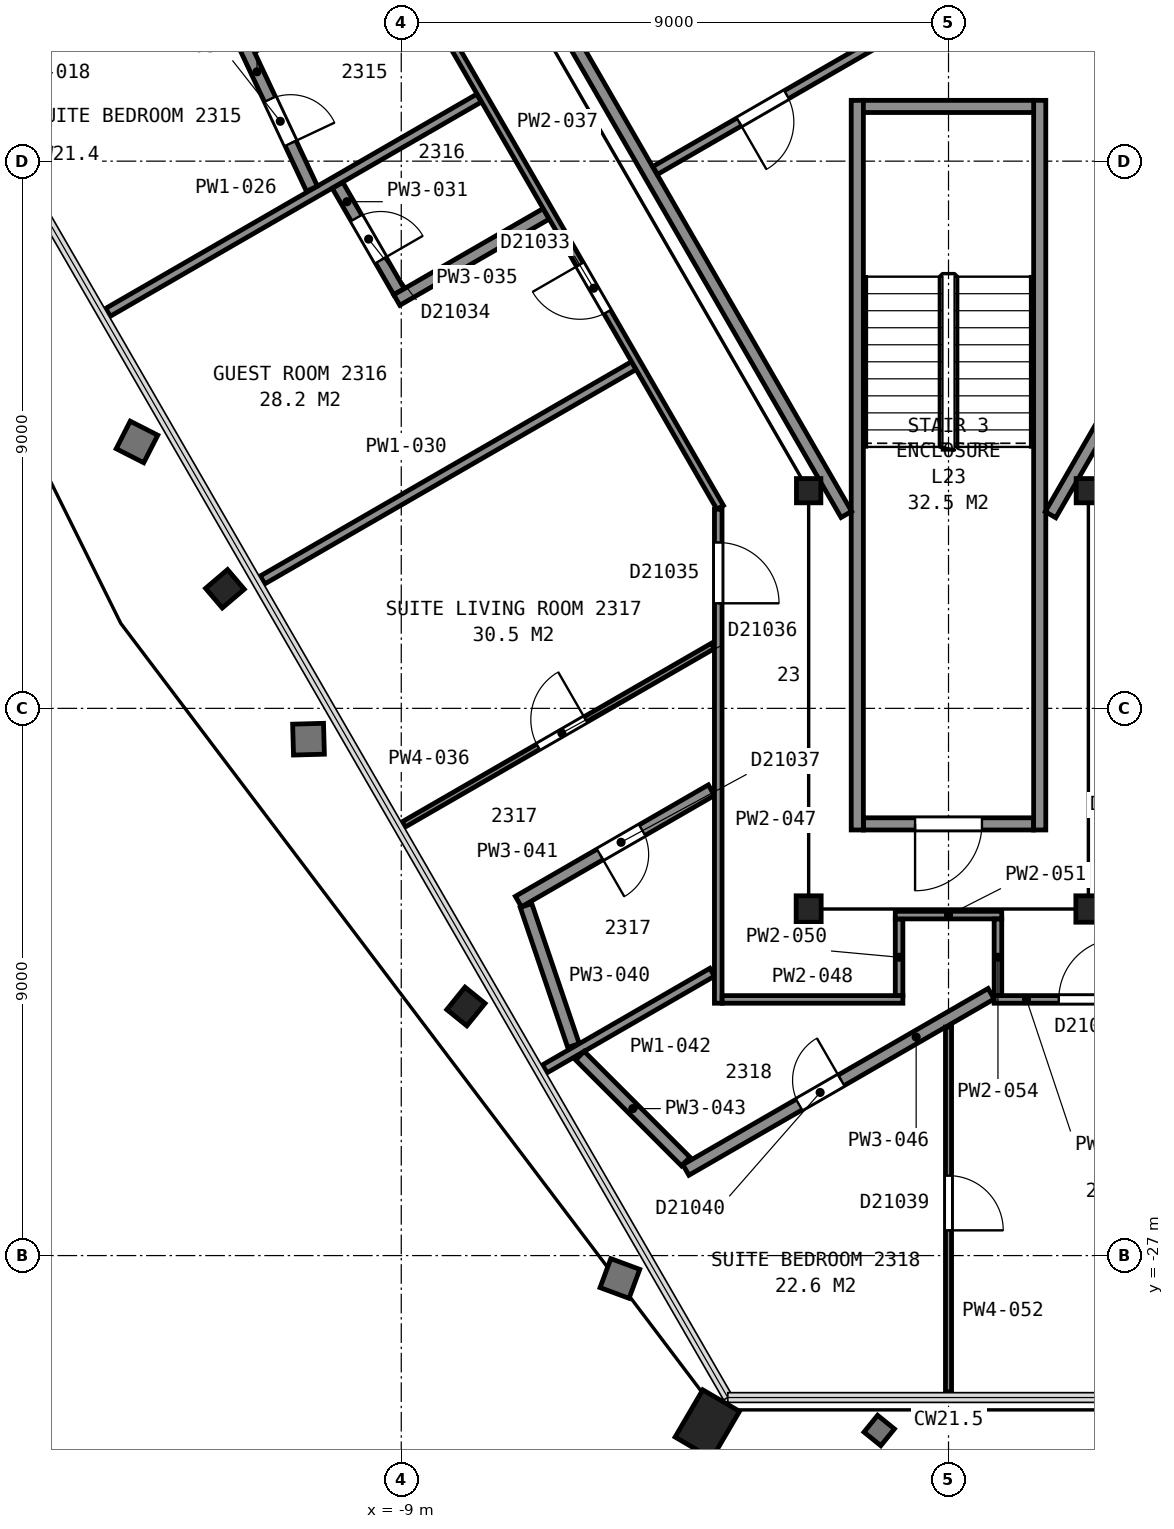
"""IFC4 building model, lengths in metres.
Left out: names, types, materials, properties, quantities, classifications, styles, units other than length and angle.
Written with IfcOpenShell. Run it as: python <this file> out.ifc"""

import sys

from ifc_helpers import new_model, si_unit, direction, frame, frame_2d, origin, origin_2d, place, context, subcontext, project, spatial, rectangle, hollow_rectangle, i_section, extrude, element, fill, save


model = new_model("IFC4")
c1 = context("Model", 3, precision=1e-05, world=origin(), true_north=direction((0.0, 1.0)))
c2 = subcontext(c1, "Body", "Model", "MODEL_VIEW")
j1 = project(units=[si_unit("LENGTHUNIT", "METRE"), si_unit("PLANEANGLEUNIT", "RADIAN")], contexts=[c1])
p1 = place(None, origin())
s1 = spatial("IfcSite", under=j1, at=p1, CompositionType="ELEMENT")
p2 = place(p1, origin())
s2 = spatial("IfcBuilding", under=s1, at=p2, CompositionType="ELEMENT")
p3 = place(p2, frame((0.0, 0.0, 100.0)))
s3 = spatial("IfcBuildingStorey", under=s2, at=p3, CompositionType="ELEMENT", Elevation=100.0)
p4 = place(p3, frame((-11.726, -15.885, 0.04), z_axis=(-0.147122626848, -0.12541489421, 0.981135075807), x_axis=(-0.499983433804, 0.865301512417, 0.035635074456)))
e1 = element("IfcColumn", 1, at=p4, inside=s3, PredefinedType="COLUMN", context=c2, shape_type="SweptSolid", body=[
    extrude(i_section(OverallWidth=0.424, OverallDepth=0.475, WebThickness=0.048, FlangeThickness=0.077, FilletRadius=0.015, at=origin_2d()), origin(), (0.0, 0.0, 1.0), 3.588),
])
p5 = place(p3, frame((-7.786, -22.717, 0.045), z_axis=(-0.127836504711, -0.157735399526, 0.979171778494), x_axis=(-0.498572298462, 0.863680403358, 0.074039341307)))
e2 = element("IfcColumn", 2, at=p5, inside=s3, PredefinedType="COLUMN", context=c2, shape_type="SweptSolid", body=[
    extrude(i_section(OverallWidth=0.424, OverallDepth=0.475, WebThickness=0.048, FlangeThickness=0.077, FilletRadius=0.015, at=origin_2d()), origin(), (0.0, 0.0, 1.0), 3.585),
])
p6 = place(p3, frame((-3.838, -29.555, 0.075), z_axis=(-0.111147334109, -0.189640824097, 0.975542222539), x_axis=(-0.993578089835, 0.000278243023, -0.113148141749)))
e3 = element("IfcColumn", 3, at=p6, inside=s3, PredefinedType="COLUMN", context=c2, shape_type="SweptSolid", body=[
    extrude(hollow_rectangle(XDim=0.7, YDim=0.9, WallThickness=0.065, at=origin_2d()), origin(), (0.0, 0.0, 1.0), 3.536),
])
p7 = place(p3, frame((-2.3, -14.42, 0.0), z_axis=(0.0, 0.0, 1.0), x_axis=(1.0, 0.0, 0.0)))
e4 = element("IfcColumn", 4, at=p7, inside=s3, PredefinedType="COLUMN", context=c2, shape_type="SweptSolid", body=[
    extrude(i_section(OverallWidth=0.401, OverallDepth=0.399, WebThickness=0.025, FlangeThickness=0.04, FilletRadius=0.015, at=origin_2d()), origin(), (0.0, 0.0, 1.0), 3.6),
])
for number, where, z_axis, x_axis in (
    (5, (-2.3, -21.3, 0.0), (0.0, 0.0, 1.0), (-1.0, 0.0, 0.0)),
    (6, (2.3, -21.3, 0.0), (0.0, 0.0, 1.0), (-1.0, 0.0, 0.0)),
):
    element("IfcColumn", number, at=place(p3, frame(where, z_axis=z_axis, x_axis=x_axis)), inside=s3, PredefinedType="COLUMN", context=c2, shape_type="SweptSolid", body=[
        extrude(i_section(OverallWidth=0.411, OverallDepth=0.434, WebThickness=0.036, FlangeThickness=0.057, FilletRadius=0.015, at=origin_2d()), origin(), (0.0, 0.0, 1.0), 3.6),
    ])
p8 = place(p3, frame((2.3, -14.42, 0.0), z_axis=(0.0, 0.0, 1.0), x_axis=(1.0, 0.0, 0.0)))
e7 = element("IfcColumn", 7, at=p8, inside=s3, PredefinedType="COLUMN", context=c2, shape_type="SweptSolid", body=[
    extrude(i_section(OverallWidth=0.401, OverallDepth=0.399, WebThickness=0.025, FlangeThickness=0.04, FilletRadius=0.015, at=origin_2d()), origin(), (0.0, 0.0, 1.0), 3.6),
])
p9 = place(p3, frame((-1.4, -19.9, 0.0), z_axis=(0.0, 0.0, 1.0), x_axis=(1.0, 0.0, 0.0)))
e8 = element("IfcWall", 8, at=p9, inside=s3, PredefinedType="PARTITIONING", context=c2, shape_type="SweptSolid", body=[
    extrude(rectangle(XDim=2.8, YDim=0.2, at=frame_2d((1.4, 0.0))), origin(), (0.0, 0.0, 1.0), 3.35),
])
p10 = place(p9, frame((0.85, 0.0, 0.0)))
e9 = element("IfcOpeningElement", 9, at=p10, cuts=e8, PredefinedType="OPENING", context=c2, shape_type="SweptSolid", body=[
    extrude(rectangle(XDim=1.1, YDim=2.1, at=frame_2d((0.55, 1.05))), frame((0.0, 0.11, 0.0), z_axis=(0.0, -1.0, 0.0), x_axis=(1.0, 0.0, 0.0)), (0.0, 0.0, 1.0), 0.22),
])
for number, where, z_axis, x_axis in (
    (10, (1.5, -8.0, 0.0), (0.0, 0.0, 1.0), (0.0, -1.0, 0.0)),
    (11, (-1.5, -8.0, 0.0), (0.0, 0.0, 1.0), (0.0, -1.0, 0.0)),
):
    element("IfcWall", number, at=place(p3, frame(where, z_axis=z_axis, x_axis=x_axis)), inside=s3, PredefinedType="PARTITIONING", context=c2, shape_type="SweptSolid", body=[
        extrude(rectangle(XDim=12.0, YDim=0.2, at=frame_2d((6.0, 0.0))), origin(), (0.0, 0.0, 1.0), 3.35),
    ])
p11 = place(p3, frame((-1.4, -8.1, 0.0), z_axis=(0.0, 0.0, 1.0), x_axis=(1.0, 0.0, 0.0)))
e12 = element("IfcWall", 12, at=p11, inside=s3, PredefinedType="PARTITIONING", context=c2, shape_type="SweptSolid", body=[
    extrude(rectangle(XDim=2.8, YDim=0.2, at=frame_2d((1.4, 0.0))), origin(), (0.0, 0.0, 1.0), 3.35),
])
p12 = place(p3, frame((-13.664, 5.946, 0.0), z_axis=(0.0, 0.0, 1.0), x_axis=(0.499994327219, -0.866028678941, 0.0)))
e13 = element("IfcWall", 13, at=p12, inside=s3, PredefinedType="PARTITIONING", context=c2, shape_type="SweptSolid", body=[
    extrude(rectangle(XDim=23.968, YDim=0.2, at=frame_2d((11.984, 0.0))), origin(), (0.0, 0.0, 1.0), 3.35),
])
p13 = place(p3, frame((-4.825, -9.154, 0.0), z_axis=(0.0, 0.0, 1.0), x_axis=(0.866023738697, 0.500002884005, 0.0)))
e14 = element("IfcWall", 14, at=p13, inside=s3, PredefinedType="PARTITIONING", context=c2, shape_type="SweptSolid", body=[
    extrude(rectangle(XDim=4.22, YDim=0.15, at=frame_2d((2.11, 0.0))), origin(), (0.0, 0.0, 1.0), 3.35),
])
p14 = place(p13, frame((1.595, 0.0, 0.0)))
e15 = element("IfcOpeningElement", 15, at=p14, cuts=e14, PredefinedType="OPENING", context=c2, shape_type="SweptSolid", body=[
    extrude(rectangle(XDim=0.9, YDim=2.1, at=frame_2d((0.45, 1.05))), frame((0.0, 0.085, 0.0), z_axis=(0.0, -1.0, 0.0), x_axis=(1.0, 0.0, 0.0)), (0.0, 0.0, 1.0), 0.17),
])
p15 = place(p3, frame((1.677, -14.815, 0.0), z_axis=(0.0, 0.0, 1.0), x_axis=(0.49999445743, 0.866028603765, 0.0)))
e16 = element("IfcWall", 16, at=p15, inside=s3, PredefinedType="PARTITIONING", context=c2, shape_type="SweptSolid", body=[
    extrude(rectangle(XDim=5.905, YDim=0.2, at=frame_2d((2.952, 0.0))), origin(), (0.0, 0.0, 1.0), 3.35),
])
p16 = place(p15, frame((3.855, 0.0, 0.0)))
e17 = element("IfcOpeningElement", 17, at=p16, cuts=e16, PredefinedType="OPENING", context=c2, shape_type="SweptSolid", body=[
    extrude(rectangle(XDim=1.8, YDim=2.1, at=frame_2d((0.9, 1.05))), frame((0.0, 0.11, 0.0), z_axis=(0.0, -1.0, 0.0), x_axis=(1.0, 0.0, 0.0)), (0.0, 0.0, 1.0), 0.22),
])
p17 = place(p3, frame((-10.037, -3.94, 0.0), z_axis=(0.0, 0.0, 1.0), x_axis=(-0.866063951978, -0.499933226626, 0.0)))
e18 = element("IfcWall", 18, at=p17, inside=s3, PredefinedType="PARTITIONING", context=c2, shape_type="SweptSolid", body=[
    extrude(rectangle(XDim=7.052, YDim=0.1, at=frame_2d((3.526, 0.0))), origin(), (0.0, 0.0, 1.0), 2.613),
])
p18 = place(p17, frame((2.998, 0.0, 0.0)))
e19 = element("IfcOpeningElement", 19, at=p18, cuts=e18, PredefinedType="OPENING", context=c2, shape_type="SweptSolid", body=[
    extrude(rectangle(XDim=0.9, YDim=2.1, at=frame_2d((0.45, 1.05))), frame((0.0, 0.06, 0.0), z_axis=(0.0, -1.0, 0.0), x_axis=(1.0, 0.0, 0.0)), (0.0, 0.0, 1.0), 0.12),
])
p19 = place(p3, frame((-13.823, -11.487, 0.0), z_axis=(0.0, 0.0, 1.0), x_axis=(0.865980767462, 0.500077304409, 0.0)))
e20 = element("IfcWall", 20, at=p19, inside=s3, PredefinedType="PARTITIONING", context=c2, shape_type="SweptSolid", body=[
    extrude(rectangle(XDim=7.047, YDim=0.15, at=frame_2d((3.524, 0.0))), origin(), (0.0, 0.0, 1.0), 2.613),
])
p20 = place(p3, frame((-11.585, -7.077, 0.0), z_axis=(0.0, 0.0, 1.0), x_axis=(0.425434257814, -0.904989332688, 0.0)))
e21 = element("IfcWall", 21, at=p20, inside=s3, PredefinedType="PARTITIONING", context=c2, shape_type="SweptSolid", body=[
    extrude(rectangle(XDim=2.625, YDim=0.2, at=frame_2d((1.313, 0.0))), origin(), (0.0, 0.0, 1.0), 2.613),
])
p21 = place(p20, frame((1.0, 0.0, 0.0)))
e22 = element("IfcOpeningElement", 22, at=p21, cuts=e21, PredefinedType="OPENING", context=c2, shape_type="SweptSolid", body=[
    extrude(rectangle(XDim=0.8, YDim=2.1, at=frame_2d((0.4, 1.05))), frame((0.0, 0.11, 0.0), z_axis=(0.0, -1.0, 0.0), x_axis=(1.0, 0.0, 0.0)), (0.0, 0.0, 1.0), 0.22),
])
p22 = place(p3, frame((-11.282, -15.888, 0.0), z_axis=(0.0, 0.0, 1.0), x_axis=(0.866031654768, 0.499989172823, 0.0)))
e23 = element("IfcWall", 23, at=p22, inside=s3, PredefinedType="PARTITIONING", context=c2, shape_type="SweptSolid", body=[
    extrude(rectangle(XDim=7.052, YDim=0.15, at=frame_2d((3.526, 0.0))), origin(), (0.0, 0.0, 1.0), 2.613),
])
p23 = place(p3, frame((-10.047, -9.398, 0.0), z_axis=(0.0, 0.0, 1.0), x_axis=(0.499935208997, -0.866062807656, 0.0)))
e24 = element("IfcWall", 24, at=p23, inside=s3, PredefinedType="PARTITIONING", context=c2, shape_type="SweptSolid", body=[
    extrude(rectangle(XDim=2.02, YDim=0.2, at=frame_2d((1.01, 0.0))), origin(), (0.0, 0.0, 1.0), 2.613),
])
p24 = place(p23, frame((0.62, 0.0, 0.0)))
e25 = element("IfcOpeningElement", 25, at=p24, cuts=e24, PredefinedType="OPENING", context=c2, shape_type="SweptSolid", body=[
    extrude(rectangle(XDim=0.8, YDim=2.1, at=frame_2d((0.4, 1.05))), frame((0.0, 0.11, 0.0), z_axis=(0.0, -1.0, 0.0), x_axis=(1.0, 0.0, 0.0)), (0.0, 0.0, 1.0), 0.22),
])
p25 = place(p3, frame((-9.074, -11.284, 0.0), z_axis=(0.0, 0.0, 1.0), x_axis=(0.866197046655, 0.499702587912, 0.0)))
e26 = element("IfcWall", 26, at=p25, inside=s3, PredefinedType="PARTITIONING", context=c2, shape_type="SweptSolid", body=[
    extrude(rectangle(XDim=2.837, YDim=0.2, at=frame_2d((1.418, 0.0))), origin(), (0.0, 0.0, 1.0), 2.613),
])
p26 = place(p3, frame((-3.875, -16.972, 0.0), z_axis=(0.0, 0.0, 1.0), x_axis=(-0.86602429061, -0.500001928069, 0.0)))
e27 = element("IfcWall", 27, at=p26, inside=s3, PredefinedType="PARTITIONING", context=c2, shape_type="SweptSolid", body=[
    extrude(rectangle(XDim=5.873, YDim=0.1, at=frame_2d((2.937, 0.0))), origin(), (0.0, 0.0, 1.0), 2.613),
])
p27 = place(p26, frame((2.419, 0.0, 0.0)))
e28 = element("IfcOpeningElement", 28, at=p27, cuts=e27, PredefinedType="OPENING", context=c2, shape_type="SweptSolid", body=[
    extrude(rectangle(XDim=0.9, YDim=2.1, at=frame_2d((0.45, 1.05))), frame((0.0, 0.06, 0.0), z_axis=(0.0, -1.0, 0.0), x_axis=(1.0, 0.0, 0.0)), (0.0, 0.0, 1.0), 0.12),
])
p28 = place(p3, frame((-3.756, -14.694, 0.0), z_axis=(0.0, 0.0, 1.0), x_axis=(-0.500051472265, 0.865995684219, 0.0)))
e29 = element("IfcWall", 29, at=p28, inside=s3, PredefinedType="PARTITIONING", context=c2, shape_type="SweptSolid", body=[
    extrude(rectangle(XDim=10.02, YDim=0.125, at=frame_2d((5.01, 0.0))), origin(), (0.0, 0.0, 1.0), 2.613),
])
p29 = place(p28, frame((3.711, 0.0, 0.0)))
e30 = element("IfcOpeningElement", 30, at=p29, cuts=e29, PredefinedType="OPENING", context=c2, shape_type="SweptSolid", body=[
    extrude(rectangle(XDim=0.9, YDim=2.1, at=frame_2d((0.45, 1.05))), frame((0.0, 0.073, 0.0), z_axis=(0.0, -1.0, 0.0), x_axis=(1.0, 0.0, 0.0)), (0.0, 0.0, 1.0), 0.145),
])
p30 = place(p3, frame((-6.948, -21.242, 0.0), z_axis=(0.0, 0.0, 1.0), x_axis=(0.321098754357, -0.947045716927, 0.0)))
e31 = element("IfcWall", 31, at=p30, inside=s3, PredefinedType="PARTITIONING", context=c2, shape_type="SweptSolid", body=[
    extrude(rectangle(XDim=2.434, YDim=0.2, at=frame_2d((1.217, 0.0))), origin(), (0.0, 0.0, 1.0), 2.613),
])
p31 = place(p3, frame((-3.899, -19.345, 0.0), z_axis=(0.0, 0.0, 1.0), x_axis=(-0.865971488458, -0.500093372459, 0.0)))
e32 = element("IfcWall", 32, at=p31, inside=s3, PredefinedType="PARTITIONING", context=c2, shape_type="SweptSolid", body=[
    extrude(rectangle(XDim=3.665, YDim=0.2, at=frame_2d((1.833, 0.0))), origin(), (0.0, 0.0, 1.0), 2.613),
])
p32 = place(p31, frame((1.315, 0.0, 0.0)))
e33 = element("IfcOpeningElement", 33, at=p32, cuts=e32, PredefinedType="OPENING", context=c2, shape_type="SweptSolid", body=[
    extrude(rectangle(XDim=0.8, YDim=2.1, at=frame_2d((0.4, 1.05))), frame((0.0, 0.11, 0.0), z_axis=(0.0, -1.0, 0.0), x_axis=(1.0, 0.0, 0.0)), (0.0, 0.0, 1.0), 0.22),
])
p33 = place(p3, frame((-6.64, -23.929, 0.0), z_axis=(0.0, 0.0, 1.0), x_axis=(0.866065365018, 0.499930778725, 0.0)))
e34 = element("IfcWall", 34, at=p33, inside=s3, PredefinedType="PARTITIONING", context=c2, shape_type="SweptSolid", body=[
    extrude(rectangle(XDim=3.179, YDim=0.15, at=frame_2d((1.589, 0.0))), origin(), (0.0, 0.0, 1.0), 2.613),
])
p34 = place(p3, frame((-6.062, -23.712, 0.0), z_axis=(0.0, 0.0, 1.0), x_axis=(0.706958057502, -0.707255473597, 0.0)))
e35 = element("IfcWall", 35, at=p34, inside=s3, PredefinedType="PARTITIONING", context=c2, shape_type="SweptSolid", body=[
    extrude(rectangle(XDim=2.463, YDim=0.2, at=frame_2d((1.231, 0.0))), origin(), (0.0, 0.0, 1.0), 2.613),
])
p35 = place(p3, frame((-4.32, -25.592, 0.0), z_axis=(0.0, 0.0, 1.0), x_axis=(0.86603408909, 0.499984956307, 0.0)))
e36 = element("IfcWall", 36, at=p35, inside=s3, PredefinedType="PARTITIONING", context=c2, shape_type="SweptSolid", body=[
    extrude(rectangle(XDim=5.797, YDim=0.2, at=frame_2d((2.898, 0.0))), origin(), (0.0, 0.0, 1.0), 2.613),
])
p36 = place(p35, frame((2.15, 0.0, 0.0)))
e37 = element("IfcOpeningElement", 37, at=p36, cuts=e36, PredefinedType="OPENING", context=c2, shape_type="SweptSolid", body=[
    extrude(rectangle(XDim=0.8, YDim=2.1, at=frame_2d((0.4, 1.05))), frame((0.0, 0.11, 0.0), z_axis=(0.0, -1.0, 0.0), x_axis=(1.0, 0.0, 0.0)), (0.0, 0.0, 1.0), 0.22),
])
p37 = place(p3, frame((-3.787, -22.85, 0.0), z_axis=(0.0, 0.0, 1.0), x_axis=(0.0, 1.0, 0.0)))
e38 = element("IfcWall", 38, at=p37, inside=s3, PredefinedType="PARTITIONING", context=c2, shape_type="SweptSolid", body=[
    extrude(rectangle(XDim=8.125, YDim=0.125, at=frame_2d((4.062, 0.0))), origin(), (0.0, 0.0, 1.0), 2.613),
])
p38 = place(p37, frame((6.577, 0.0, 0.0)))
e39 = element("IfcOpeningElement", 39, at=p38, cuts=e38, PredefinedType="OPENING", context=c2, shape_type="SweptSolid", body=[
    extrude(rectangle(XDim=1.0, YDim=2.1, at=frame_2d((0.5, 1.05))), frame((0.0, 0.073, 0.0), z_axis=(0.0, -1.0, 0.0), x_axis=(1.0, 0.0, 0.0)), (0.0, 0.0, 1.0), 0.145),
])
p39 = place(p3, frame((-3.722, -22.787, 0.0), z_axis=(0.0, 0.0, 1.0), x_axis=(1.0, 0.0, 0.0)))
e40 = element("IfcWall", 40, at=p39, inside=s3, PredefinedType="PARTITIONING", context=c2, shape_type="SweptSolid", body=[
    extrude(rectangle(XDim=2.971, YDim=0.125, at=frame_2d((1.486, 0.0))), origin(), (0.0, 0.0, 1.0), 2.613),
])
p40 = place(p3, frame((-0.813, -22.722, 0.0), z_axis=(0.0, 0.0, 1.0), x_axis=(0.0, 1.0, 0.0)))
e41 = element("IfcWall", 41, at=p40, inside=s3, PredefinedType="PARTITIONING", context=c2, shape_type="SweptSolid", body=[
    extrude(rectangle(XDim=1.257, YDim=0.125, at=frame_2d((0.628, 0.0))), origin(), (0.0, 0.0, 1.0), 2.613),
])
p41 = place(p3, frame((-0.875, -21.4, 0.0), z_axis=(0.0, 0.0, 1.0), x_axis=(1.0, 0.0, 0.0)))
e42 = element("IfcWall", 42, at=p41, inside=s3, PredefinedType="PARTITIONING", context=c2, shape_type="SweptSolid", body=[
    extrude(rectangle(XDim=1.751, YDim=0.125, at=frame_2d((0.875, 0.0))), origin(), (0.0, 0.0, 1.0), 2.613),
])
p42 = place(p3, frame((0.0, -29.239, 0.0), z_axis=(0.0, 0.0, 1.0), x_axis=(0.0, 1.0, 0.0)))
e43 = element("IfcWall", 43, at=p42, inside=s3, PredefinedType="PARTITIONING", context=c2, shape_type="SweptSolid", body=[
    extrude(rectangle(XDim=5.997, YDim=0.1, at=frame_2d((2.998, 0.0))), origin(), (0.0, 0.0, 1.0), 2.613),
])
p43 = place(p42, frame((2.654, 0.0, 0.0)))
e44 = element("IfcOpeningElement", 44, at=p43, cuts=e43, PredefinedType="OPENING", context=c2, shape_type="SweptSolid", body=[
    extrude(rectangle(XDim=0.9, YDim=2.1, at=frame_2d((0.45, 1.05))), frame((0.0, 0.06, 0.0), z_axis=(0.0, -1.0, 0.0), x_axis=(1.0, 0.0, 0.0)), (0.0, 0.0, 1.0), 0.12),
])
p44 = place(p3, frame((0.813, -22.722, 0.0), z_axis=(0.0, 0.0, 1.0), x_axis=(0.0, 1.0, 0.0)))
e45 = element("IfcWall", 45, at=p44, inside=s3, PredefinedType="PARTITIONING", context=c2, shape_type="SweptSolid", body=[
    extrude(rectangle(XDim=1.257, YDim=0.125, at=frame_2d((0.628, 0.0))), origin(), (0.0, 0.0, 1.0), 2.613),
])
p45 = place(p3, frame((3.722, -22.787, 0.0), z_axis=(0.0, 0.0, 1.0), x_axis=(-1.0, 0.0, 0.0)))
e46 = element("IfcWall", 46, at=p45, inside=s3, PredefinedType="PARTITIONING", context=c2, shape_type="SweptSolid", body=[
    extrude(rectangle(XDim=2.971, YDim=0.125, at=frame_2d((1.486, 0.0))), origin(), (0.0, 0.0, 1.0), 2.613),
])
p46 = place(p45, frame((0.909, 0.0, 0.0)))
e47 = element("IfcOpeningElement", 47, at=p46, cuts=e46, PredefinedType="OPENING", context=c2, shape_type="SweptSolid", body=[
    extrude(rectangle(XDim=1.0, YDim=2.1, at=frame_2d((0.5, 1.05))), frame((0.0, 0.073, 0.0), z_axis=(0.0, -1.0, 0.0), x_axis=(1.0, 0.0, 0.0)), (0.0, 0.0, 1.0), 0.145),
])
p47 = place(p10, origin())
e48 = element("IfcDoor", 48, at=p47, inside=s3, OperationType="SINGLE_SWING_LEFT", PredefinedType="DOOR", context=c2, shape_type="SweptSolid", body=[
    extrude(rectangle(XDim=1.1, YDim=2.1, at=frame_2d((0.55, 1.05))), frame((0.0, 0.025, 0.0), z_axis=(0.0, -1.0, 0.0), x_axis=(1.0, 0.0, 0.0)), (0.0, 0.0, 1.0), 0.05),
])
fill(e9, e48)
p48 = place(p14, origin())
e49 = element("IfcDoor", 49, at=p48, inside=s3, OperationType="SINGLE_SWING_LEFT", PredefinedType="DOOR", context=c2, shape_type="SweptSolid", body=[
    extrude(rectangle(XDim=0.9, YDim=2.1, at=frame_2d((0.45, 1.05))), frame((0.0, 0.025, 0.0), z_axis=(0.0, -1.0, 0.0), x_axis=(1.0, 0.0, 0.0)), (0.0, 0.0, 1.0), 0.05),
])
fill(e15, e49)
p49 = place(p21, origin())
e50 = element("IfcDoor", 50, at=p49, inside=s3, OperationType="SINGLE_SWING_RIGHT", PredefinedType="DOOR", context=c2, shape_type="SweptSolid", body=[
    extrude(rectangle(XDim=0.8, YDim=2.1, at=frame_2d((0.4, 1.05))), frame((0.0, 0.025, 0.0), z_axis=(0.0, -1.0, 0.0), x_axis=(1.0, 0.0, 0.0)), (0.0, 0.0, 1.0), 0.05),
])
fill(e22, e50)
p50 = place(p24, origin())
e51 = element("IfcDoor", 51, at=p50, inside=s3, OperationType="SINGLE_SWING_RIGHT", PredefinedType="DOOR", context=c2, shape_type="SweptSolid", body=[
    extrude(rectangle(XDim=0.8, YDim=2.1, at=frame_2d((0.4, 1.05))), frame((0.0, 0.025, 0.0), z_axis=(0.0, -1.0, 0.0), x_axis=(1.0, 0.0, 0.0)), (0.0, 0.0, 1.0), 0.05),
])
fill(e25, e51)
p51 = place(p27, origin())
e52 = element("IfcDoor", 52, at=p51, inside=s3, OperationType="SINGLE_SWING_LEFT", PredefinedType="DOOR", context=c2, shape_type="SweptSolid", body=[
    extrude(rectangle(XDim=0.9, YDim=2.1, at=frame_2d((0.45, 1.05))), frame((0.0, 0.025, 0.0), z_axis=(0.0, -1.0, 0.0), x_axis=(1.0, 0.0, 0.0)), (0.0, 0.0, 1.0), 0.05),
])
fill(e28, e52)
p52 = place(p29, origin())
e53 = element("IfcDoor", 53, at=p52, inside=s3, OperationType="SINGLE_SWING_RIGHT", PredefinedType="DOOR", context=c2, shape_type="SweptSolid", body=[
    extrude(rectangle(XDim=0.9, YDim=2.1, at=frame_2d((0.45, 1.05))), frame((0.0, 0.025, 0.0), z_axis=(0.0, -1.0, 0.0), x_axis=(1.0, 0.0, 0.0)), (0.0, 0.0, 1.0), 0.05),
])
fill(e30, e53)
p53 = place(p32, origin())
e54 = element("IfcDoor", 54, at=p53, inside=s3, OperationType="SINGLE_SWING_RIGHT", PredefinedType="DOOR", context=c2, shape_type="SweptSolid", body=[
    extrude(rectangle(XDim=0.8, YDim=2.1, at=frame_2d((0.4, 1.05))), frame((0.0, 0.025, 0.0), z_axis=(0.0, -1.0, 0.0), x_axis=(1.0, 0.0, 0.0)), (0.0, 0.0, 1.0), 0.05),
])
fill(e33, e54)
p54 = place(p36, origin())
e55 = element("IfcDoor", 55, at=p54, inside=s3, OperationType="SINGLE_SWING_RIGHT", PredefinedType="DOOR", context=c2, shape_type="SweptSolid", body=[
    extrude(rectangle(XDim=0.8, YDim=2.1, at=frame_2d((0.4, 1.05))), frame((0.0, 0.025, 0.0), z_axis=(0.0, -1.0, 0.0), x_axis=(1.0, 0.0, 0.0)), (0.0, 0.0, 1.0), 0.05),
])
fill(e37, e55)
p55 = place(p38, origin())
e56 = element("IfcDoor", 56, at=p55, inside=s3, OperationType="SINGLE_SWING_LEFT", PredefinedType="DOOR", context=c2, shape_type="SweptSolid", body=[
    extrude(rectangle(XDim=1.0, YDim=2.1, at=frame_2d((0.5, 1.05))), frame((0.0, 0.025, 0.0), z_axis=(0.0, -1.0, 0.0), x_axis=(1.0, 0.0, 0.0)), (0.0, 0.0, 1.0), 0.05),
])
fill(e39, e56)
p56 = place(p43, origin())
e57 = element("IfcDoor", 57, at=p56, inside=s3, OperationType="SINGLE_SWING_LEFT", PredefinedType="DOOR", context=c2, shape_type="SweptSolid", body=[
    extrude(rectangle(XDim=0.9, YDim=2.1, at=frame_2d((0.45, 1.05))), frame((0.0, 0.025, 0.0), z_axis=(0.0, -1.0, 0.0), x_axis=(1.0, 0.0, 0.0)), (0.0, 0.0, 1.0), 0.05),
])
fill(e44, e57)
p57 = place(p46, origin())
e58 = element("IfcDoor", 58, at=p57, inside=s3, OperationType="SINGLE_SWING_LEFT", PredefinedType="DOOR", context=c2, shape_type="SweptSolid", body=[
    extrude(rectangle(XDim=1.0, YDim=2.1, at=frame_2d((0.5, 1.05))), frame((0.0, 0.025, 0.0), z_axis=(0.0, -1.0, 0.0), x_axis=(1.0, 0.0, 0.0)), (0.0, 0.0, 1.0), 0.05),
])
fill(e47, e58)
save(model, sys.argv[1])
